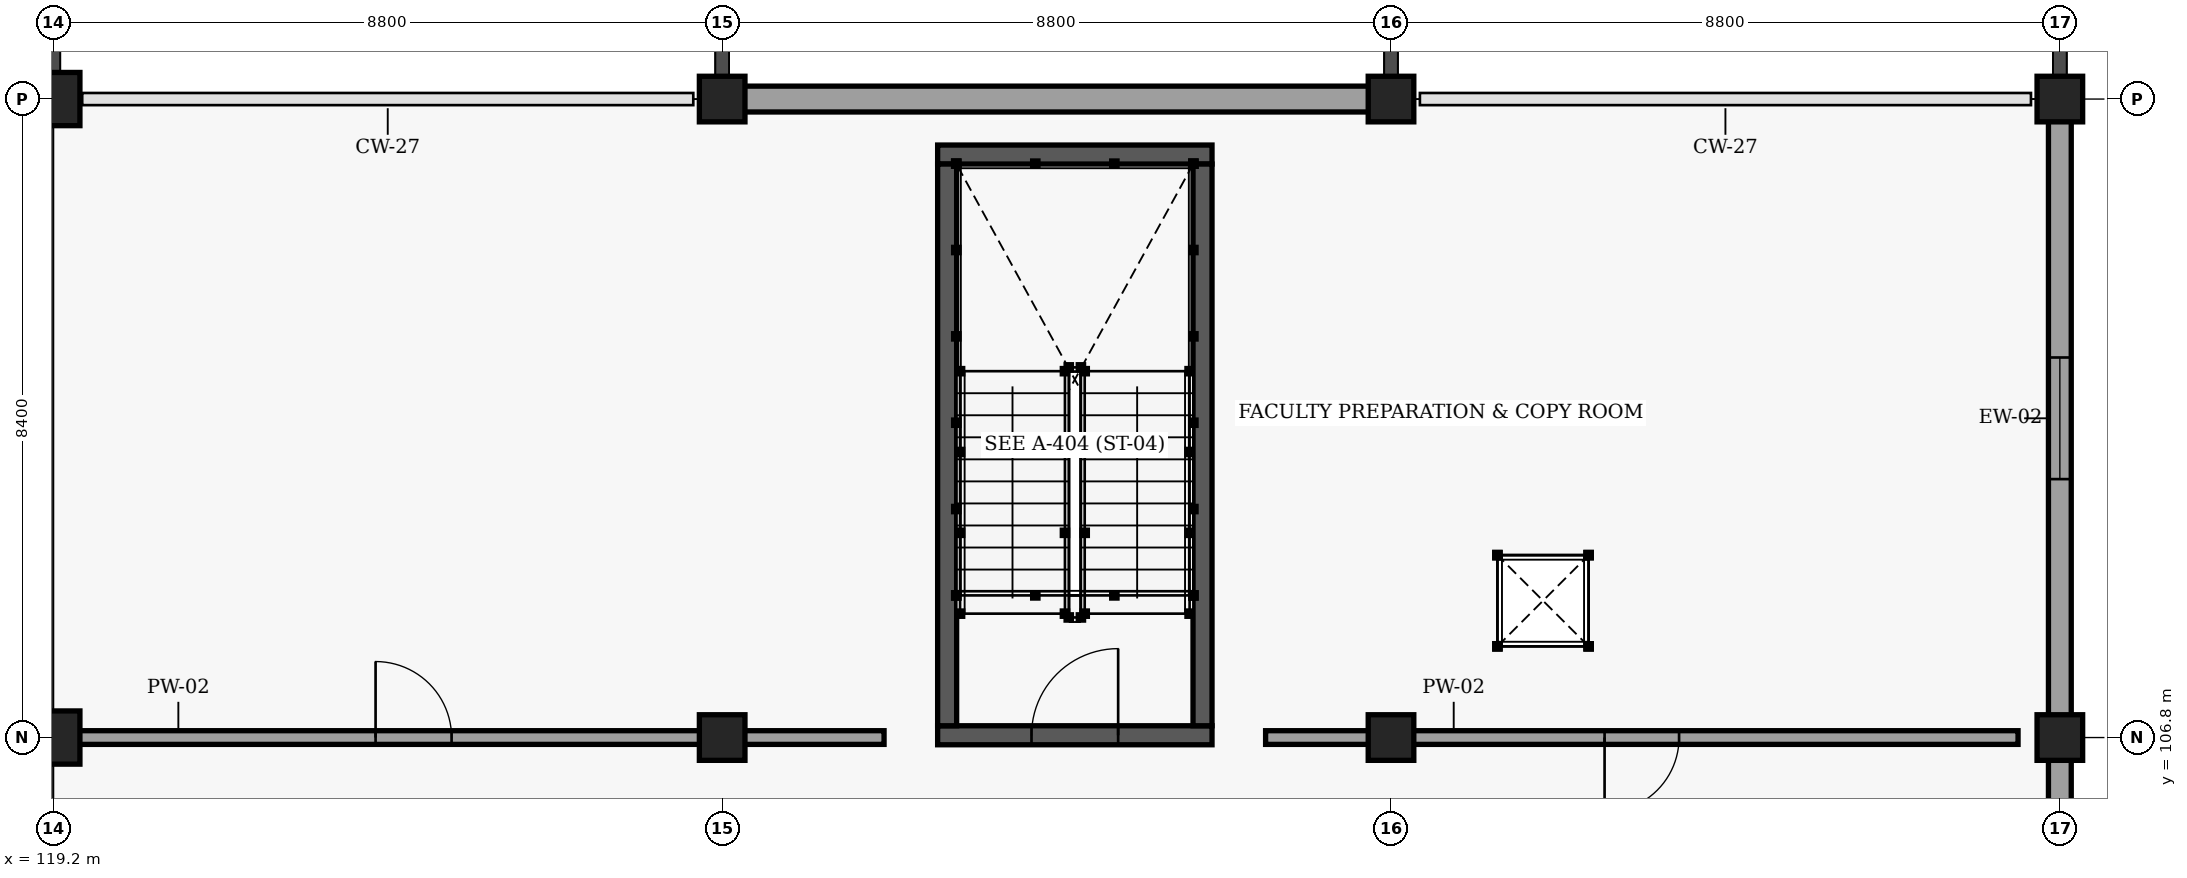
"""IFC4 building model, lengths in metres.
Left out: names, types, materials, properties, quantities, classifications, styles, units other than length and angle.
Written with IfcOpenShell. Run it as: python <this file> out.ifc"""

import sys

from ifc_helpers import new_model, si_unit, direction, frame, frame_2d, origin, origin_2d, place, context, subcontext, project, spatial, rectangle, extrude, element, fill, save


model = new_model("IFC4")
c1 = context("Model", 3, precision=1e-05, world=origin(), true_north=direction((0.0, 1.0)))
c2 = subcontext(c1, "Body", "Model", "MODEL_VIEW")
j1 = project(units=[si_unit("LENGTHUNIT", "METRE"), si_unit("PLANEANGLEUNIT", "RADIAN")], contexts=[c1])
p1 = place(None, origin())
s1 = spatial("IfcSite", under=j1, at=p1, CompositionType="ELEMENT")
p2 = place(p1, origin())
s2 = spatial("IfcBuilding", under=s1, at=p2, CompositionType="ELEMENT")
p3 = place(p2, frame((0.0, 0.0, 4.8)))
s3 = spatial("IfcBuildingStorey", under=s2, at=p3, CompositionType="ELEMENT", Elevation=4.8)
for number, where, z_axis, x_axis in (
    (1, (119.2, 106.8, 0.0), (0.0, 0.0, 1.0), (1.0, 0.0, 0.0)),
    (2, (119.2, 115.2, 0.0), (0.0, 0.0, 1.0), (1.0, 0.0, 0.0)),
):
    element("IfcColumn", number, at=place(p3, frame(where, z_axis=z_axis, x_axis=x_axis)), inside=s3, PredefinedType="COLUMN", context=c2, shape_type="SweptSolid", body=[
        extrude(rectangle(XDim=0.7, YDim=0.7, at=origin_2d()), origin(), (0.0, 0.0, 1.0), 4.2),
    ])
for number, where, z_axis, x_axis in (
    (3, (128.0, 106.8, 0.0), (0.0, 0.0, 1.0), (1.0, 0.0, 0.0)),
    (4, (128.0, 115.2, 0.0), (0.0, 0.0, 1.0), (1.0, 0.0, 0.0)),
    (5, (136.8, 106.8, 0.0), (0.0, 0.0, 1.0), (1.0, 0.0, 0.0)),
    (6, (136.8, 115.2, 0.0), (0.0, 0.0, 1.0), (1.0, 0.0, 0.0)),
    (7, (145.6, 106.8, 0.0), (0.0, 0.0, 1.0), (1.0, 0.0, 0.0)),
    (8, (145.6, 115.2, 0.0), (0.0, 0.0, 1.0), (1.0, 0.0, 0.0)),
):
    element("IfcColumn", number, at=place(p3, frame(where, z_axis=z_axis, x_axis=x_axis)), inside=s3, PredefinedType="COLUMN", context=c2, shape_type="SweptSolid", body=[
        extrude(rectangle(XDim=0.6, YDim=0.6, at=origin_2d()), origin(), (0.0, 0.0, 1.0), 4.2),
    ])
p4 = place(p3, frame((128.1, 115.2, 0.0), z_axis=(0.0, 0.0, 1.0), x_axis=(1.0, 0.0, 0.0)))
e9 = element("IfcWall", 9, at=p4, inside=s3, PredefinedType="SOLIDWALL", context=c2, shape_type="SweptSolid", body=[
    extrude(rectangle(XDim=8.6, YDim=0.34, at=frame_2d((4.3, 0.0))), origin(), (0.0, 0.0, 1.0), 3.145),
])
p5 = place(p3, frame((145.6, 98.5, 0.0), z_axis=(0.0, 0.0, 1.0), x_axis=(0.0, 1.0, 0.0)))
e10 = element("IfcWall", 10, at=p5, inside=s3, PredefinedType="SOLIDWALL", context=c2, shape_type="SweptSolid", body=[
    extrude(rectangle(XDim=8.2, YDim=0.3, at=frame_2d((4.1, 0.0))), origin(), (0.0, 0.0, 1.0), 3.495),
])
p6 = place(p5, frame((3.3, 0.0, 0.9)))
e11 = element("IfcOpeningElement", 11, at=p6, cuts=e10, PredefinedType="OPENING", context=c2, shape_type="SweptSolid", body=[
    extrude(rectangle(XDim=1.6, YDim=2.1, at=frame_2d((0.8, 1.05))), frame((0.0, 0.16, 0.0), z_axis=(0.0, -1.0, 0.0), x_axis=(1.0, 0.0, 0.0)), (0.0, 0.0, 1.0), 0.32),
])
p7 = place(p3, frame((145.6, 106.9, 0.0), z_axis=(0.0, 0.0, 1.0), x_axis=(0.0, 1.0, 0.0)))
e12 = element("IfcWall", 12, at=p7, inside=s3, PredefinedType="SOLIDWALL", context=c2, shape_type="SweptSolid", body=[
    extrude(rectangle(XDim=8.2, YDim=0.3, at=frame_2d((4.1, 0.0))), origin(), (0.0, 0.0, 1.0), 3.495),
])
p8 = place(p7, frame((3.3, 0.0, 0.9)))
e13 = element("IfcOpeningElement", 13, at=p8, cuts=e12, PredefinedType="OPENING", context=c2, shape_type="SweptSolid", body=[
    extrude(rectangle(XDim=1.6, YDim=2.1, at=frame_2d((0.8, 1.05))), frame((0.0, 0.16, 0.0), z_axis=(0.0, -1.0, 0.0), x_axis=(1.0, 0.0, 0.0)), (0.0, 0.0, 1.0), 0.32),
])
p9 = place(p3, frame((134.445, 106.83, 0.0), z_axis=(0.0, 0.0, 1.0), x_axis=(-1.0, 0.0, 0.0)))
e14 = element("IfcWall", 14, at=p9, inside=s3, PredefinedType="SHEAR", context=c2, shape_type="SweptSolid", body=[
    extrude(rectangle(XDim=3.61, YDim=0.25, at=frame_2d((1.805, 0.0))), origin(), (0.0, 0.0, 1.0), 3.96),
])
p10 = place(p9, frame((1.235, 0.0, 0.0)))
e15 = element("IfcOpeningElement", 15, at=p10, cuts=e14, PredefinedType="OPENING", context=c2, shape_type="SweptSolid", body=[
    extrude(rectangle(XDim=1.14, YDim=2.15, at=frame_2d((0.57, 1.075))), frame((0.0, 0.135, 0.0), z_axis=(0.0, -1.0, 0.0), x_axis=(1.0, 0.0, 0.0)), (0.0, 0.0, 1.0), 0.27),
])
p11 = place(p3, frame((130.835, 114.47, 0.0), z_axis=(0.0, 0.0, 1.0), x_axis=(1.0, 0.0, 0.0)))
e16 = element("IfcWall", 16, at=p11, inside=s3, PredefinedType="SHEAR", context=c2, shape_type="SweptSolid", body=[
    extrude(rectangle(XDim=3.61, YDim=0.25, at=frame_2d((1.805, 0.0))), origin(), (0.0, 0.0, 1.0), 3.96),
])
for number, where, z_axis, x_axis in (
    (17, (130.96, 106.955, 0.0), (0.0, 0.0, 1.0), (0.0, 1.0, 0.0)),
    (18, (134.32, 114.345, 0.0), (0.0, 0.0, 1.0), (0.0, -1.0, 0.0)),
):
    element("IfcWall", number, at=place(p3, frame(where, z_axis=z_axis, x_axis=x_axis)), inside=s3, PredefinedType="SHEAR", context=c2, shape_type="SweptSolid", body=[
        extrude(rectangle(XDim=7.39, YDim=0.25, at=frame_2d((3.695, 0.0))), origin(), (0.0, 0.0, 1.0), 3.96),
    ])
p12 = place(p3, frame((117.75, 106.8, 0.0), z_axis=(0.0, 0.0, 1.0), x_axis=(1.0, 0.0, 0.0)))
e19 = element("IfcWall", 19, at=p12, inside=s3, PredefinedType="PARTITIONING", context=c2, shape_type="SweptSolid", body=[
    extrude(rectangle(XDim=12.38, YDim=0.18, at=frame_2d((6.19, 0.0))), origin(), (0.0, 0.0, 1.0), 3.145),
])
p13 = place(p12, frame((5.69, 0.0, 0.0)))
e20 = element("IfcOpeningElement", 20, at=p13, cuts=e19, PredefinedType="OPENING", context=c2, shape_type="SweptSolid", body=[
    extrude(rectangle(XDim=1.0, YDim=2.14, at=frame_2d((0.5, 1.07))), frame((0.0, 0.1, 0.0), z_axis=(0.0, -1.0, 0.0), x_axis=(1.0, 0.0, 0.0)), (0.0, 0.0, 1.0), 0.2),
])
p14 = place(p3, frame((135.15, 106.8, 0.0), z_axis=(0.0, 0.0, 1.0), x_axis=(1.0, 0.0, 0.0)))
e21 = element("IfcWall", 21, at=p14, inside=s3, PredefinedType="PARTITIONING", context=c2, shape_type="SweptSolid", body=[
    extrude(rectangle(XDim=9.9, YDim=0.18, at=frame_2d((4.95, 0.0))), origin(), (0.0, 0.0, 1.0), 3.145),
])
p15 = place(p14, frame((4.46, 0.0, 0.0)))
e22 = element("IfcOpeningElement", 22, at=p15, cuts=e21, PredefinedType="OPENING", context=c2, shape_type="SweptSolid", body=[
    extrude(rectangle(XDim=0.98, YDim=2.12, at=frame_2d((0.49, 1.06))), frame((0.0, 0.1, 0.0), z_axis=(0.0, -1.0, 0.0), x_axis=(1.0, 0.0, 0.0)), (0.0, 0.0, 1.0), 0.2),
])
p16 = place(p8, origin())
e23 = element("IfcWindow", 23, at=p16, inside=s3, PartitioningType="SINGLE_PANEL", PredefinedType="WINDOW", context=c2, shape_type="SweptSolid", body=[
    extrude(rectangle(XDim=1.6, YDim=2.1, at=frame_2d((0.8, 1.05))), frame((0.0, 0.03, 0.0), z_axis=(0.0, -1.0, 0.0), x_axis=(1.0, 0.0, 0.0)), (0.0, 0.0, 1.0), 0.06),
])
fill(e13, e23)
p17 = place(p10, origin())
e24 = element("IfcDoor", 24, at=p17, inside=s3, OperationType="SINGLE_SWING_RIGHT", PredefinedType="DOOR", context=c2, shape_type="SweptSolid", body=[
    extrude(rectangle(XDim=1.14, YDim=2.15, at=frame_2d((0.57, 1.075))), frame((0.0, 0.025, 0.0), z_axis=(0.0, -1.0, 0.0), x_axis=(1.0, 0.0, 0.0)), (0.0, 0.0, 1.0), 0.05),
])
fill(e15, e24)
p18 = place(p13, origin())
e25 = element("IfcDoor", 25, at=p18, inside=s3, OperationType="SINGLE_SWING_LEFT", PredefinedType="DOOR", context=c2, shape_type="SweptSolid", body=[
    extrude(rectangle(XDim=1.0, YDim=2.14, at=frame_2d((0.5, 1.07))), frame((0.0, 0.025, 0.0), z_axis=(0.0, -1.0, 0.0), x_axis=(1.0, 0.0, 0.0)), (0.0, 0.0, 1.0), 0.05),
])
fill(e20, e25)
p19 = place(p15, origin())
e26 = element("IfcDoor", 26, at=p19, inside=s3, OperationType="SINGLE_SWING_RIGHT", PredefinedType="DOOR", context=c2, shape_type="SweptSolid", body=[
    extrude(rectangle(XDim=0.98, YDim=2.12, at=frame_2d((0.49, 1.06))), frame((0.0, 0.025, 0.0), z_axis=(0.0, -1.0, 0.0), x_axis=(1.0, 0.0, 0.0)), (0.0, 0.0, 1.0), 0.05),
])
fill(e22, e26)
save(model, sys.argv[1])
